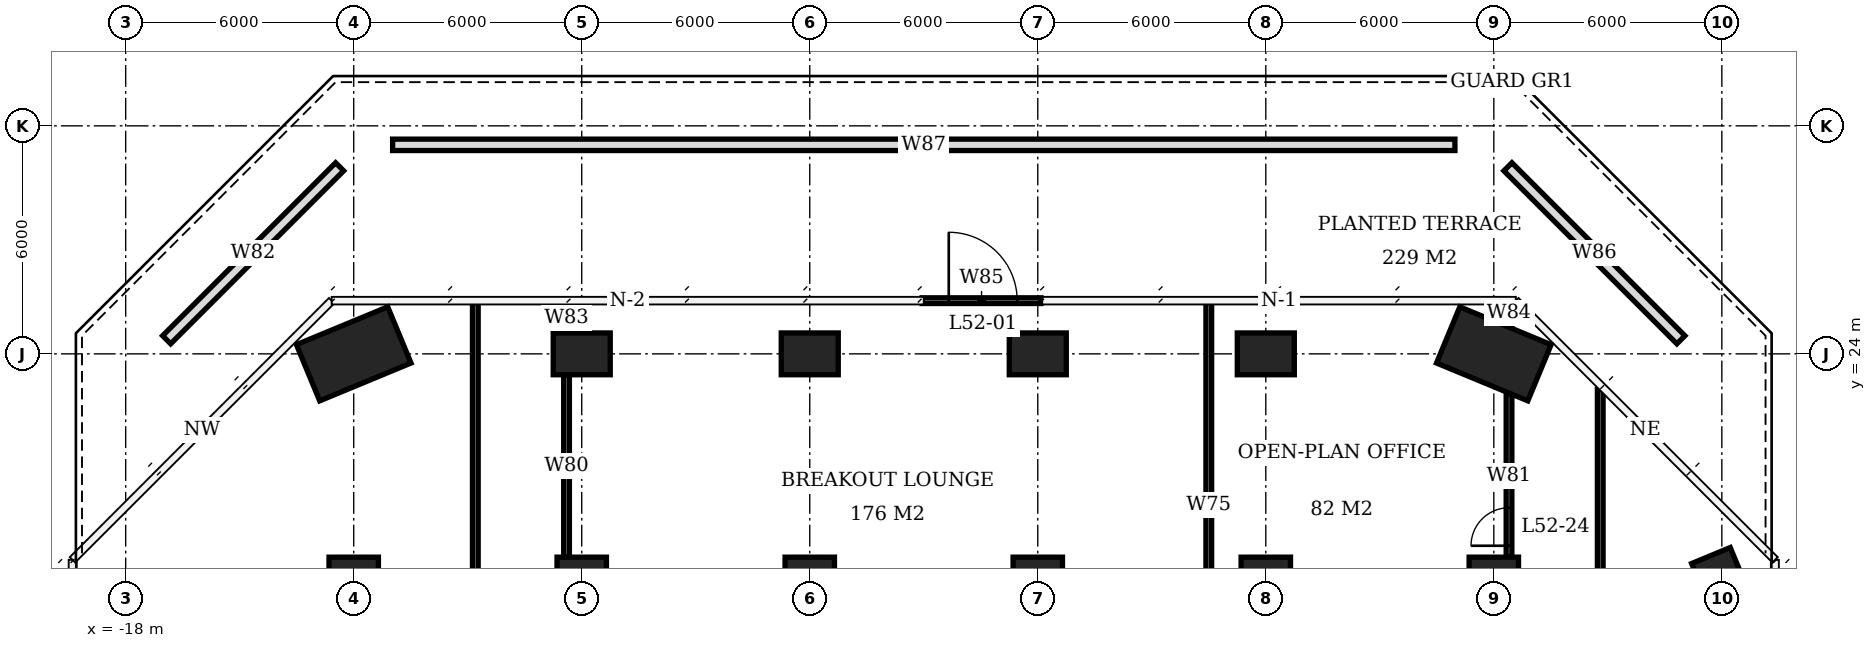
"""IFC4 building model, lengths in metres.
Left out: names, types, materials, properties, quantities, classifications, styles, units other than length and angle.
Written with IfcOpenShell. Run it as: python <this file> out.ifc"""

import sys

from ifc_helpers import new_model, si_unit, direction, frame, frame_2d, origin, origin_2d, place, context, subcontext, project, spatial, rectangle, extrude, element, fill, save


model = new_model("IFC4")
c1 = context("Model", 3, precision=1e-05, world=origin(), true_north=direction((0.0, 1.0)))
c2 = subcontext(c1, "Body", "Model", "MODEL_VIEW")
j1 = project(units=[si_unit("LENGTHUNIT", "METRE"), si_unit("PLANEANGLEUNIT", "RADIAN")], contexts=[c1])
p1 = place(None, origin())
s1 = spatial("IfcSite", under=j1, at=p1, CompositionType="ELEMENT")
p2 = place(p1, origin())
s2 = spatial("IfcBuilding", under=s1, at=p2, CompositionType="ELEMENT")
p3 = place(p2, frame((0.0, 0.0, 212.3)))
s3 = spatial("IfcBuildingStorey", under=s2, at=p3, CompositionType="ELEMENT", Elevation=212.3)
p4 = place(p3, frame((-12.0, 18.0, 0.0), z_axis=(0.0, 0.0, 1.0), x_axis=(1.0, 0.0, 0.0)))
e1 = element("IfcColumn", 1, at=p4, inside=s3, PredefinedType="COLUMN", context=c2, shape_type="SweptSolid", body=[
    extrude(rectangle(XDim=1.3, YDim=1.3, at=origin_2d()), origin(), (0.0, 0.0, 1.0), 3.9),
])
p5 = place(p3, frame((-12.0, 24.0, 0.0), z_axis=(0.0, 0.0, 1.0), x_axis=(0.923879532511, 0.382683432365, 0.0)))
e2 = element("IfcColumn", 2, at=p5, inside=s3, PredefinedType="COLUMN", context=c2, shape_type="SweptSolid", body=[
    extrude(rectangle(XDim=2.6, YDim=1.6, at=origin_2d()), origin(), (0.0, 0.0, 1.0), 3.9),
])
p6 = place(p3, frame((-6.0, 18.0, 0.0), z_axis=(0.0, 0.0, 1.0), x_axis=(1.0, 0.0, 0.0)))
e3 = element("IfcColumn", 3, at=p6, inside=s3, PredefinedType="COLUMN", context=c2, shape_type="SweptSolid", body=[
    extrude(rectangle(XDim=1.3, YDim=1.3, at=origin_2d()), origin(), (0.0, 0.0, 1.0), 3.9),
])
p7 = place(p3, frame((-6.0, 24.0, 0.0), z_axis=(0.0, 0.0, 1.0), x_axis=(1.0, 0.0, 0.0)))
e4 = element("IfcColumn", 4, at=p7, inside=s3, PredefinedType="COLUMN", context=c2, shape_type="SweptSolid", body=[
    extrude(rectangle(XDim=1.5, YDim=1.1, at=origin_2d()), origin(), (0.0, 0.0, 1.0), 3.9),
])
p8 = place(p3, frame((0.0, 18.0, 0.0), z_axis=(0.0, 0.0, 1.0), x_axis=(1.0, 0.0, 0.0)))
e5 = element("IfcColumn", 5, at=p8, inside=s3, PredefinedType="COLUMN", context=c2, shape_type="SweptSolid", body=[
    extrude(rectangle(XDim=1.3, YDim=1.3, at=origin_2d()), origin(), (0.0, 0.0, 1.0), 3.9),
])
p9 = place(p3, frame((0.0, 24.0, 0.0), z_axis=(0.0, 0.0, 1.0), x_axis=(1.0, 0.0, 0.0)))
e6 = element("IfcColumn", 6, at=p9, inside=s3, PredefinedType="COLUMN", context=c2, shape_type="SweptSolid", body=[
    extrude(rectangle(XDim=1.5, YDim=1.1, at=origin_2d()), origin(), (0.0, 0.0, 1.0), 3.9),
])
p10 = place(p3, frame((6.0, 18.0, 0.0), z_axis=(0.0, 0.0, 1.0), x_axis=(1.0, 0.0, 0.0)))
e7 = element("IfcColumn", 7, at=p10, inside=s3, PredefinedType="COLUMN", context=c2, shape_type="SweptSolid", body=[
    extrude(rectangle(XDim=1.3, YDim=1.3, at=origin_2d()), origin(), (0.0, 0.0, 1.0), 3.9),
])
p11 = place(p3, frame((6.0, 24.0, 0.0), z_axis=(0.0, 0.0, 1.0), x_axis=(1.0, 0.0, 0.0)))
e8 = element("IfcColumn", 8, at=p11, inside=s3, PredefinedType="COLUMN", context=c2, shape_type="SweptSolid", body=[
    extrude(rectangle(XDim=1.5, YDim=1.1, at=origin_2d()), origin(), (0.0, 0.0, 1.0), 3.9),
])
p12 = place(p3, frame((12.0, 18.0, 0.0), z_axis=(0.0, 0.0, 1.0), x_axis=(1.0, 0.0, 0.0)))
e9 = element("IfcColumn", 9, at=p12, inside=s3, PredefinedType="COLUMN", context=c2, shape_type="SweptSolid", body=[
    extrude(rectangle(XDim=1.3, YDim=1.3, at=origin_2d()), origin(), (0.0, 0.0, 1.0), 3.9),
])
p13 = place(p3, frame((12.0, 24.0, 0.0), z_axis=(0.0, 0.0, 1.0), x_axis=(1.0, 0.0, 0.0)))
e10 = element("IfcColumn", 10, at=p13, inside=s3, PredefinedType="COLUMN", context=c2, shape_type="SweptSolid", body=[
    extrude(rectangle(XDim=1.5, YDim=1.1, at=origin_2d()), origin(), (0.0, 0.0, 1.0), 3.9),
])
p14 = place(p3, frame((18.0, 18.0, 0.0), z_axis=(0.0, 0.0, 1.0), x_axis=(1.0, 0.0, 0.0)))
e11 = element("IfcColumn", 11, at=p14, inside=s3, PredefinedType="COLUMN", context=c2, shape_type="SweptSolid", body=[
    extrude(rectangle(XDim=1.3, YDim=1.3, at=origin_2d()), origin(), (0.0, 0.0, 1.0), 3.9),
])
p15 = place(p3, frame((18.0, 24.0, 0.0), z_axis=(0.0, 0.0, 1.0), x_axis=(0.923879532511, -0.382683432365, 0.0)))
e12 = element("IfcColumn", 12, at=p15, inside=s3, PredefinedType="COLUMN", context=c2, shape_type="SweptSolid", body=[
    extrude(rectangle(XDim=2.6, YDim=1.6, at=origin_2d()), origin(), (0.0, 0.0, 1.0), 3.9),
])
p16 = place(p3, frame((24.0, 18.0, 0.0), z_axis=(0.0, 0.0, 1.0), x_axis=(0.382683432365, -0.923879532511, 0.0)))
e13 = element("IfcColumn", 13, at=p16, inside=s3, PredefinedType="COLUMN", context=c2, shape_type="SweptSolid", body=[
    extrude(rectangle(XDim=1.5, YDim=1.1, at=origin_2d()), origin(), (0.0, 0.0, 1.0), 3.9),
])
p17 = place(p3, frame((2.958, 25.4, 0.0), z_axis=(0.0, 0.0, 1.0), x_axis=(1.0, 0.0, 0.0)))
e14 = element("IfcWall", 14, at=p17, inside=s3, PredefinedType="USERDEFINED", context=c2, shape_type="SweptSolid", body=[
    extrude(rectangle(XDim=3.126, YDim=0.15, at=frame_2d((1.563, 0.0))), origin(), (0.0, 0.0, 1.0), 3.9),
])
p18 = place(p17, frame((0.7, 0.0, 0.0)))
e15 = element("IfcOpeningElement", 15, at=p18, cuts=e14, PredefinedType="OPENING", context=c2, shape_type="SweptSolid", body=[
    extrude(rectangle(XDim=1.8, YDim=2.4, at=frame_2d((0.9, 1.2))), frame((0.0, 0.085, 0.0), z_axis=(0.0, -1.0, 0.0), x_axis=(1.0, 0.0, 0.0)), (0.0, 0.0, 1.0), 0.17),
])
p19 = place(p3, frame((-16.923, 24.37, 0.0), z_axis=(0.0, 0.0, 1.0), x_axis=(0.707106781187, 0.707106781187, 0.0)))
e16 = element("IfcWall", 16, at=p19, inside=s3, PredefinedType="USERDEFINED", context=c2, shape_type="SweptSolid", body=[
    extrude(rectangle(XDim=6.438, YDim=0.3, at=frame_2d((3.219, 0.0))), origin(), (0.0, 0.0, 1.0), 0.6),
])
p20 = place(p3, frame((-10.976, 29.5, 0.0), z_axis=(0.0, 0.0, 1.0), x_axis=(1.0, 0.0, 0.0)))
e17 = element("IfcWall", 17, at=p20, inside=s3, PredefinedType="USERDEFINED", context=c2, shape_type="SweptSolid", body=[
    extrude(rectangle(XDim=27.953, YDim=0.3, at=frame_2d((13.976, 0.0))), origin(), (0.0, 0.0, 1.0), 0.6),
])
p21 = place(p3, frame((18.37, 28.923, 0.0), z_axis=(0.0, 0.0, 1.0), x_axis=(0.707106781187, -0.707106781187, 0.0)))
e18 = element("IfcWall", 18, at=p21, inside=s3, PredefinedType="USERDEFINED", context=c2, shape_type="SweptSolid", body=[
    extrude(rectangle(XDim=6.438, YDim=0.3, at=frame_2d((3.219, 0.0))), origin(), (0.0, 0.0, 1.0), 0.6),
])
p22 = place(p3, frame((-8.8, 7.575, 0.0), z_axis=(0.0, 0.0, 1.0), x_axis=(0.0, 1.0, 0.0)))
e19 = element("IfcWall", 19, at=p22, inside=s3, PredefinedType="PARTITIONING", context=c2, shape_type="SweptSolid", body=[
    extrude(rectangle(XDim=17.825, YDim=0.15, at=frame_2d((8.913, 0.0))), origin(), (0.0, 0.0, 1.0), 3.65),
])
p23 = place(p22, frame((5.655, 0.0, 0.0)))
e20 = element("IfcOpeningElement", 20, at=p23, cuts=e19, PredefinedType="OPENING", context=c2, shape_type="SweptSolid", body=[
    extrude(rectangle(XDim=1.0, YDim=2.1, at=frame_2d((0.5, 1.05))), frame((0.0, 0.085, 0.0), z_axis=(0.0, -1.0, 0.0), x_axis=(1.0, 0.0, 0.0)), (0.0, 0.0, 1.0), 0.17),
])
p24 = place(p3, frame((-6.4, 18.65, 0.0), z_axis=(0.0, 0.0, 1.0), x_axis=(0.0, 1.0, 0.0)))
e21 = element("IfcWall", 21, at=p24, inside=s3, PredefinedType="PARTITIONING", context=c2, shape_type="SweptSolid", body=[
    extrude(rectangle(XDim=4.8, YDim=0.15, at=frame_2d((2.4, 0.0))), origin(), (0.0, 0.0, 1.0), 3.65),
])
p25 = place(p3, frame((-6.4, 24.55, 0.0), z_axis=(0.0, 0.0, 1.0), x_axis=(0.0, 1.0, 0.0)))
e22 = element("IfcWall", 22, at=p25, inside=s3, PredefinedType="PARTITIONING", context=c2, shape_type="SweptSolid", body=[
    extrude(rectangle(XDim=0.8, YDim=0.15, at=frame_2d((0.4, 0.0))), origin(), (0.0, 0.0, 1.0), 3.65),
])
p26 = place(p3, frame((10.5, 14.65, 0.0), z_axis=(0.0, 0.0, 1.0), x_axis=(0.0, 1.0, 0.0)))
e23 = element("IfcWall", 23, at=p26, inside=s3, PredefinedType="PARTITIONING", context=c2, shape_type="SweptSolid", body=[
    extrude(rectangle(XDim=10.75, YDim=0.15, at=frame_2d((5.375, 0.0))), origin(), (0.0, 0.0, 1.0), 3.65),
])
p27 = place(p3, frame((18.4, 18.65, 0.0), z_axis=(0.0, 0.0, 1.0), x_axis=(0.0, 1.0, 0.0)))
e24 = element("IfcWall", 24, at=p27, inside=s3, PredefinedType="PARTITIONING", context=c2, shape_type="SweptSolid", body=[
    extrude(rectangle(XDim=4.287, YDim=0.15, at=frame_2d((2.144, 0.0))), origin(), (0.0, 0.0, 1.0), 3.65),
])
p28 = place(p27, frame((0.3, 0.0, 0.0)))
e25 = element("IfcOpeningElement", 25, at=p28, cuts=e24, PredefinedType="OPENING", context=c2, shape_type="SweptSolid", body=[
    extrude(rectangle(XDim=1.0, YDim=2.1, at=frame_2d((0.5, 1.05))), frame((0.0, 0.085, 0.0), z_axis=(0.0, -1.0, 0.0), x_axis=(1.0, 0.0, 0.0)), (0.0, 0.0, 1.0), 0.17),
])
p29 = place(p3, frame((18.4, 24.731, 0.0), z_axis=(0.0, 0.0, 1.0), x_axis=(0.0, 1.0, 0.0)))
e26 = element("IfcWall", 26, at=p29, inside=s3, PredefinedType="PARTITIONING", context=c2, shape_type="SweptSolid", body=[
    extrude(rectangle(XDim=0.669, YDim=0.15, at=frame_2d((0.334, 0.0))), origin(), (0.0, 0.0, 1.0), 3.65),
])
p30 = place(p3, frame((20.8, 1.575, 0.0), z_axis=(0.0, 0.0, 1.0), x_axis=(0.0, 1.0, 0.0)))
e27 = element("IfcWall", 27, at=p30, inside=s3, PredefinedType="PARTITIONING", context=c2, shape_type="SweptSolid", body=[
    extrude(rectangle(XDim=21.489, YDim=0.15, at=frame_2d((10.745, 0.0))), origin(), (0.0, 0.0, 1.0), 3.65),
])
p31 = place(p30, frame((13.425, 0.0, 0.0)))
e28 = element("IfcOpeningElement", 28, at=p31, cuts=e27, PredefinedType="OPENING", context=c2, shape_type="SweptSolid", body=[
    extrude(rectangle(XDim=1.0, YDim=2.1, at=frame_2d((0.5, 1.05))), frame((0.0, 0.085, 0.0), z_axis=(0.0, -1.0, 0.0), x_axis=(1.0, 0.0, 0.0)), (0.0, 0.0, 1.0), 0.17),
])
p32 = place(p18, origin())
e29 = element("IfcDoor", 29, at=p32, inside=s3, OperationType="DOUBLE_DOOR_SINGLE_SWING", PredefinedType="DOOR", context=c2, shape_type="SweptSolid", body=[
    extrude(rectangle(XDim=1.8, YDim=2.4, at=frame_2d((0.9, 1.2))), frame((0.0, 0.025, 0.0), z_axis=(0.0, -1.0, 0.0), x_axis=(1.0, 0.0, 0.0)), (0.0, 0.0, 1.0), 0.05),
])
fill(e15, e29)
p33 = place(p28, origin())
e30 = element("IfcDoor", 30, at=p33, inside=s3, OperationType="SINGLE_SWING_LEFT", PredefinedType="DOOR", context=c2, shape_type="SweptSolid", body=[
    extrude(rectangle(XDim=1.0, YDim=2.1, at=frame_2d((0.5, 1.05))), frame((0.0, 0.025, 0.0), z_axis=(0.0, -1.0, 0.0), x_axis=(1.0, 0.0, 0.0)), (0.0, 0.0, 1.0), 0.05),
])
fill(e25, e30)
save(model, sys.argv[1])
